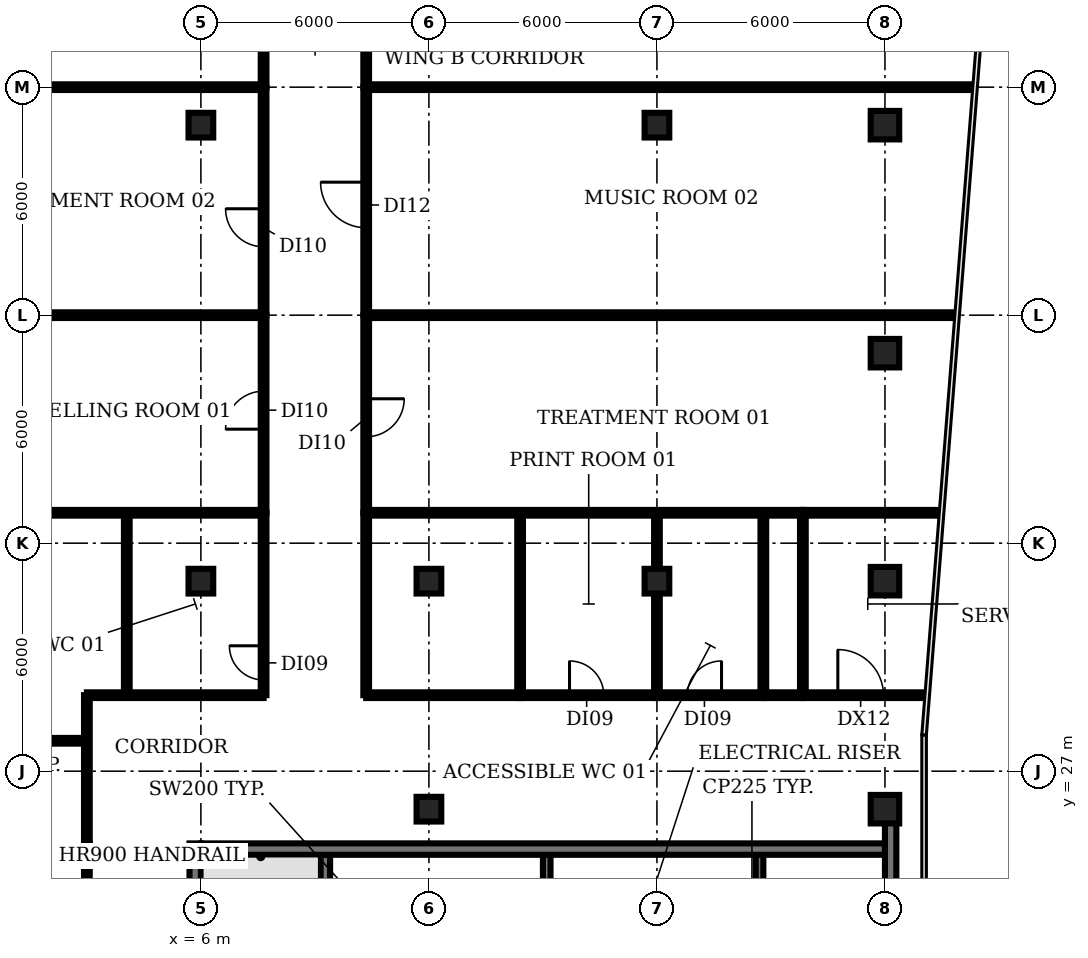
"""IFC4 building model, lengths in metres.
Left out: names, types, materials, properties, quantities, classifications, styles, units other than length and angle.
Written with IfcOpenShell. Run it as: python <this file> out.ifc"""

import sys

from ifc_helpers import new_model, si_unit, direction, frame, frame_2d, origin, origin_2d, place, context, subcontext, project, spatial, rectangle, extrude, element, fill, save


model = new_model("IFC4")
c1 = context("Model", 3, precision=1e-05, world=origin(), true_north=direction((0.0, 1.0)))
c2 = subcontext(c1, "Body", "Model", "MODEL_VIEW")
j1 = project(units=[si_unit("LENGTHUNIT", "METRE"), si_unit("PLANEANGLEUNIT", "RADIAN")], contexts=[c1])
p1 = place(None, origin())
s1 = spatial("IfcSite", under=j1, at=p1, CompositionType="ELEMENT")
p2 = place(p1, origin())
s2 = spatial("IfcBuilding", under=s1, at=p2, CompositionType="ELEMENT")
p3 = place(p2, frame((0.0, 0.0, 268.4)))
s3 = spatial("IfcBuildingStorey", under=s2, at=p3, CompositionType="ELEMENT", Elevation=268.4)
for number, where, z_axis, x_axis in (
    (1, (6.0, 32.0, 0.0), (0.0, 0.0, 1.0), (1.0, 0.0, 0.0)),
    (2, (6.0, 44.0, 0.0), (0.0, 0.0, 1.0), (1.0, 0.0, 0.0)),
    (3, (12.0, 26.0, 0.0), (0.0, 0.0, 1.0), (1.0, 0.0, 0.0)),
    (4, (12.0, 32.0, 0.0), (0.0, 0.0, 1.0), (1.0, 0.0, 0.0)),
    (5, (18.0, 32.0, 0.0), (0.0, 0.0, 1.0), (1.0, 0.0, 0.0)),
    (6, (18.0, 44.0, 0.0), (0.0, 0.0, 1.0), (1.0, 0.0, 0.0)),
):
    element("IfcColumn", number, at=place(p3, frame(where, z_axis=z_axis, x_axis=x_axis)), inside=s3, PredefinedType="COLUMN", context=c2, shape_type="SweptSolid", body=[
        extrude(rectangle(XDim=0.65, YDim=0.65, at=origin_2d()), origin(), (0.0, 0.0, 1.0), 3.8),
    ])
for number, where, z_axis, x_axis in (
    (7, (24.0, 26.0, 0.0), (0.0, 0.0, 1.0), (1.0, 0.0, 0.0)),
    (8, (24.0, 32.0, 0.0), (0.0, 0.0, 1.0), (1.0, 0.0, 0.0)),
    (9, (24.0, 38.0, 0.0), (0.0, 0.0, 1.0), (1.0, 0.0, 0.0)),
    (10, (24.0, 44.0, 0.0), (0.0, 0.0, 1.0), (1.0, 0.0, 0.0)),
):
    element("IfcColumn", number, at=place(p3, frame(where, z_axis=z_axis, x_axis=x_axis)), inside=s3, PredefinedType="COLUMN", context=c2, shape_type="SweptSolid", body=[
        extrude(rectangle(XDim=0.75, YDim=0.75, at=origin_2d()), origin(), (0.0, 0.0, 1.0), 3.8),
    ])
p4 = place(p3, frame((9.275, 18.375, 0.0), z_axis=(0.0, 0.0, 1.0), x_axis=(0.0, 1.0, 0.0)))
e11 = element("IfcWall", 11, at=p4, inside=s3, PredefinedType="SHEAR", context=c2, shape_type="SweptSolid", body=[
    extrude(rectangle(XDim=6.425, YDim=0.25, at=frame_2d((3.212, 0.0))), origin(), (0.0, 0.0, 1.0), 3.8),
])
for number, where, z_axis, x_axis in (
    (12, (15.1, 22.9, 0.0), (0.0, 0.0, 1.0), (0.0, 1.0, 0.0)),
    (13, (20.7, 22.9, 0.0), (0.0, 0.0, 1.0), (0.0, 1.0, 0.0)),
):
    element("IfcWall", number, at=place(p3, frame(where, z_axis=z_axis, x_axis=x_axis)), inside=s3, PredefinedType="SHEAR", context=c2, shape_type="SweptSolid", body=[
        extrude(rectangle(XDim=1.9, YDim=0.2, at=frame_2d((0.95, 0.0))), origin(), (0.0, 0.0, 1.0), 3.8),
    ])
p5 = place(p3, frame((5.85, 5.1, 0.0), z_axis=(0.0, 0.0, 1.0), x_axis=(0.0, 1.0, 0.0)))
e14 = element("IfcWall", 14, at=p5, inside=s3, PredefinedType="SHEAR", context=c2, shape_type="SweptSolid", body=[
    extrude(rectangle(XDim=20.0, YDim=0.3, at=frame_2d((10.0, 0.0))), origin(), (0.0, 0.0, 1.0), 3.8),
])
p6 = place(p5, frame((0.55, 0.0, 0.0)))
e15 = element("IfcOpeningElement", 15, at=p6, cuts=e14, PredefinedType="OPENING", context=c2, shape_type="SweptSolid", body=[
    extrude(rectangle(XDim=1.5, YDim=2.1, at=frame_2d((0.75, 1.05))), frame((0.0, 0.16, 0.0), z_axis=(0.0, -1.0, 0.0), x_axis=(1.0, 0.0, 0.0)), (0.0, 0.0, 1.0), 0.32),
])
p7 = place(p5, frame((7.0, 0.0, 0.0)))
e16 = element("IfcOpeningElement", 16, at=p7, cuts=e14, PredefinedType="OPENING", context=c2, shape_type="SweptSolid", body=[
    extrude(rectangle(XDim=1.2, YDim=2.1, at=frame_2d((0.6, 1.05))), frame((0.0, 0.16, 0.0), z_axis=(0.0, -1.0, 0.0), x_axis=(1.0, 0.0, 0.0)), (0.0, 0.0, 1.0), 0.32),
])
p8 = place(p5, frame((13.55, 0.0, 0.0)))
e17 = element("IfcOpeningElement", 17, at=p8, cuts=e14, PredefinedType="OPENING", context=c2, shape_type="SweptSolid", body=[
    extrude(rectangle(XDim=1.2, YDim=2.1, at=frame_2d((0.6, 1.05))), frame((0.0, 0.16, 0.0), z_axis=(0.0, -1.0, 0.0), x_axis=(1.0, 0.0, 0.0)), (0.0, 0.0, 1.0), 0.32),
])
p9 = place(p3, frame((24.15, 25.655, 0.0), z_axis=(0.0, 0.0, 1.0), x_axis=(0.0, -1.0, 0.0)))
e18 = element("IfcWall", 18, at=p9, inside=s3, PredefinedType="SHEAR", context=c2, shape_type="SweptSolid", body=[
    extrude(rectangle(XDim=20.555, YDim=0.3, at=frame_2d((10.277, 0.0))), origin(), (0.0, 0.0, 1.0), 3.8),
])
p10 = place(p9, frame((18.505, 0.0, 0.0)))
e19 = element("IfcOpeningElement", 19, at=p10, cuts=e18, PredefinedType="OPENING", context=c2, shape_type="SweptSolid", body=[
    extrude(rectangle(XDim=1.5, YDim=2.1, at=frame_2d((0.75, 1.05))), frame((0.0, 0.16, 0.0), z_axis=(0.0, -1.0, 0.0), x_axis=(1.0, 0.0, 0.0)), (0.0, 0.0, 1.0), 0.32),
])
p11 = place(p9, frame((12.405, 0.0, 0.0)))
e20 = element("IfcOpeningElement", 20, at=p11, cuts=e18, PredefinedType="OPENING", context=c2, shape_type="SweptSolid", body=[
    extrude(rectangle(XDim=0.9, YDim=2.1, at=frame_2d((0.45, 1.05))), frame((0.0, 0.16, 0.0), z_axis=(0.0, -1.0, 0.0), x_axis=(1.0, 0.0, 0.0)), (0.0, 0.0, 1.0), 0.32),
])
p12 = place(p9, frame((6.405, 0.0, 0.0)))
e21 = element("IfcOpeningElement", 21, at=p12, cuts=e18, PredefinedType="OPENING", context=c2, shape_type="SweptSolid", body=[
    extrude(rectangle(XDim=2.0, YDim=2.1, at=frame_2d((1.0, 1.05))), frame((0.0, 0.16, 0.0), z_axis=(0.0, -1.0, 0.0), x_axis=(1.0, 0.0, 0.0)), (0.0, 0.0, 1.0), 0.32),
])
p13 = place(p3, frame((6.0, 24.95, 0.0), z_axis=(0.0, 0.0, 1.0), x_axis=(1.0, 0.0, 0.0)))
e22 = element("IfcWall", 22, at=p13, inside=s3, PredefinedType="SHEAR", context=c2, shape_type="SweptSolid", body=[
    extrude(rectangle(XDim=18.0, YDim=0.3, at=frame_2d((9.0, 0.0))), origin(), (0.0, 0.0, 1.0), 3.8),
])
p14 = place(p3, frame((-1.07, 27.8, 0.0), z_axis=(0.0, 0.0, 1.0), x_axis=(1.0, 0.0, 0.0)))
e23 = element("IfcWall", 23, at=p14, inside=s3, PredefinedType="PARTITIONING", context=c2, shape_type="SweptSolid", body=[
    extrude(rectangle(XDim=4.07, YDim=0.15, at=frame_2d((2.035, 0.0))), origin(), (0.0, 0.0, 1.0), 2.85),
])
for number, where, z_axis, x_axis in (
    (24, (-0.98, 33.8, 0.0), (0.0, 0.0, 1.0), (1.0, 0.0, 0.0)),
    (25, (-0.98, 39.0, 0.0), (0.0, 0.0, 1.0), (1.0, 0.0, 0.0)),
    (26, (-0.98, 45.0, 0.0), (0.0, 0.0, 1.0), (1.0, 0.0, 0.0)),
):
    element("IfcWall", number, at=place(p3, frame(where, z_axis=z_axis, x_axis=x_axis)), inside=s3, PredefinedType="PARTITIONING", context=c2, shape_type="SweptSolid", body=[
        extrude(rectangle(XDim=8.63, YDim=0.15, at=frame_2d((4.315, 0.0))), origin(), (0.0, 0.0, 1.0), 2.85),
    ])
p15 = place(p3, frame((3.0, 5.1, 0.0), z_axis=(0.0, 0.0, 1.0), x_axis=(0.0, 1.0, 0.0)))
e27 = element("IfcWall", 27, at=p15, inside=s3, PredefinedType="PARTITIONING", context=c2, shape_type="SweptSolid", body=[
    extrude(rectangle(XDim=20.0, YDim=0.15, at=frame_2d((10.0, 0.0))), origin(), (0.0, 0.0, 1.0), 2.85),
])
p16 = place(p15, frame((9.3, 0.0, 0.0)))
e28 = element("IfcOpeningElement", 28, at=p16, cuts=e27, PredefinedType="OPENING", context=c2, shape_type="SweptSolid", body=[
    extrude(rectangle(XDim=1.2, YDim=2.1, at=frame_2d((0.6, 1.05))), frame((0.0, 0.085, 0.0), z_axis=(0.0, -1.0, 0.0), x_axis=(1.0, 0.0, 0.0)), (0.0, 0.0, 1.0), 0.17),
])
p17 = place(p3, frame((3.0, 25.1, 0.0), z_axis=(0.0, 0.0, 1.0), x_axis=(0.0, 1.0, 0.0)))
e29 = element("IfcWall", 29, at=p17, inside=s3, PredefinedType="PARTITIONING", context=c2, shape_type="SweptSolid", body=[
    extrude(rectangle(XDim=3.9, YDim=0.15, at=frame_2d((1.95, 0.0))), origin(), (0.0, 0.0, 1.0), 2.85),
])
p18 = place(p3, frame((3.0, 29.0, 0.0), z_axis=(0.0, 0.0, 1.0), x_axis=(1.0, 0.0, 0.0)))
e30 = element("IfcWall", 30, at=p18, inside=s3, PredefinedType="PARTITIONING", context=c2, shape_type="SweptSolid", body=[
    extrude(rectangle(XDim=4.65, YDim=0.15, at=frame_2d((2.325, 0.0))), origin(), (0.0, 0.0, 1.0), 2.85),
])
p19 = place(p3, frame((4.05, 29.0, 0.0), z_axis=(0.0, 0.0, 1.0), x_axis=(0.0, 1.0, 0.0)))
e31 = element("IfcWall", 31, at=p19, inside=s3, PredefinedType="PARTITIONING", context=c2, shape_type="SweptSolid", body=[
    extrude(rectangle(XDim=4.8, YDim=0.15, at=frame_2d((2.4, 0.0))), origin(), (0.0, 0.0, 1.0), 2.85),
])
p20 = place(p3, frame((7.65, 29.0, 0.0), z_axis=(0.0, 0.0, 1.0), x_axis=(0.0, 1.0, 0.0)))
e32 = element("IfcWall", 32, at=p20, inside=s3, PredefinedType="PARTITIONING", context=c2, shape_type="SweptSolid", body=[
    extrude(rectangle(XDim=4.8, YDim=0.15, at=frame_2d((2.4, 0.0))), origin(), (0.0, 0.0, 1.0), 2.85),
])
p21 = place(p20, frame((0.4, 0.0, 0.0)))
e33 = element("IfcOpeningElement", 33, at=p21, cuts=e32, PredefinedType="OPENING", context=c2, shape_type="SweptSolid", body=[
    extrude(rectangle(XDim=0.9, YDim=2.1, at=frame_2d((0.45, 1.05))), frame((0.0, 0.085, 0.0), z_axis=(0.0, -1.0, 0.0), x_axis=(1.0, 0.0, 0.0)), (0.0, 0.0, 1.0), 0.17),
])
p22 = place(p3, frame((7.65, 33.8, 0.0), z_axis=(0.0, 0.0, 1.0), x_axis=(0.0, 1.0, 0.0)))
e34 = element("IfcWall", 34, at=p22, inside=s3, PredefinedType="PARTITIONING", context=c2, shape_type="SweptSolid", body=[
    extrude(rectangle(XDim=5.2, YDim=0.15, at=frame_2d((2.6, 0.0))), origin(), (0.0, 0.0, 1.0), 2.85),
])
p23 = place(p22, frame((2.2, 0.0, 0.0)))
e35 = element("IfcOpeningElement", 35, at=p23, cuts=e34, PredefinedType="OPENING", context=c2, shape_type="SweptSolid", body=[
    extrude(rectangle(XDim=1.0, YDim=2.1, at=frame_2d((0.5, 1.05))), frame((0.0, 0.085, 0.0), z_axis=(0.0, -1.0, 0.0), x_axis=(1.0, 0.0, 0.0)), (0.0, 0.0, 1.0), 0.17),
])
p24 = place(p3, frame((7.65, 39.0, 0.0), z_axis=(0.0, 0.0, 1.0), x_axis=(0.0, 1.0, 0.0)))
e36 = element("IfcWall", 36, at=p24, inside=s3, PredefinedType="PARTITIONING", context=c2, shape_type="SweptSolid", body=[
    extrude(rectangle(XDim=6.0, YDim=0.15, at=frame_2d((3.0, 0.0))), origin(), (0.0, 0.0, 1.0), 2.85),
])
p25 = place(p24, frame((1.8, 0.0, 0.0)))
e37 = element("IfcOpeningElement", 37, at=p25, cuts=e36, PredefinedType="OPENING", context=c2, shape_type="SweptSolid", body=[
    extrude(rectangle(XDim=1.0, YDim=2.1, at=frame_2d((0.5, 1.05))), frame((0.0, 0.085, 0.0), z_axis=(0.0, -1.0, 0.0), x_axis=(1.0, 0.0, 0.0)), (0.0, 0.0, 1.0), 0.17),
])
p26 = place(p3, frame((7.65, 57.0, 0.0), z_axis=(0.0, 0.0, 1.0), x_axis=(0.0, -1.0, 0.0)))
e38 = element("IfcWall", 38, at=p26, inside=s3, PredefinedType="PARTITIONING", context=c2, shape_type="SweptSolid", body=[
    extrude(rectangle(XDim=12.0, YDim=0.15, at=frame_2d((6.0, 0.0))), origin(), (0.0, 0.0, 1.0), 2.85),
])
p27 = place(p26, frame((5.3, 0.0, 0.0)))
e39 = element("IfcOpeningElement", 39, at=p27, cuts=e38, PredefinedType="OPENING", context=c2, shape_type="SweptSolid", body=[
    extrude(rectangle(XDim=1.2, YDim=2.1, at=frame_2d((0.6, 1.05))), frame((0.0, 0.085, 0.0), z_axis=(0.0, -1.0, 0.0), x_axis=(1.0, 0.0, 0.0)), (0.0, 0.0, 1.0), 0.17),
])
p28 = place(p3, frame((10.35, 29.0, 0.0), z_axis=(0.0, 0.0, 1.0), x_axis=(0.0, 1.0, 0.0)))
e40 = element("IfcWall", 40, at=p28, inside=s3, PredefinedType="PARTITIONING", context=c2, shape_type="SweptSolid", body=[
    extrude(rectangle(XDim=4.8, YDim=0.15, at=frame_2d((2.4, 0.0))), origin(), (0.0, 0.0, 1.0), 2.85),
])
p29 = place(p3, frame((10.35, 29.0, 0.0), z_axis=(0.0, 0.0, 1.0), x_axis=(1.0, 0.0, 0.0)))
e41 = element("IfcWall", 41, at=p29, inside=s3, PredefinedType="PARTITIONING", context=c2, shape_type="SweptSolid", body=[
    extrude(rectangle(XDim=4.05, YDim=0.15, at=frame_2d((2.025, 0.0))), origin(), (0.0, 0.0, 1.0), 2.85),
])
p30 = place(p3, frame((10.35, 33.8, 0.0), z_axis=(0.0, 0.0, 1.0), x_axis=(1.0, 0.0, 0.0)))
e42 = element("IfcWall", 42, at=p30, inside=s3, PredefinedType="PARTITIONING", context=c2, shape_type="SweptSolid", body=[
    extrude(rectangle(XDim=11.49, YDim=0.15, at=frame_2d((5.745, 0.0))), origin(), (0.0, 0.0, 1.0), 2.85),
])
p31 = place(p3, frame((10.35, 39.0, 0.0), z_axis=(0.0, 0.0, 1.0), x_axis=(0.0, -1.0, 0.0)))
e43 = element("IfcWall", 43, at=p31, inside=s3, PredefinedType="PARTITIONING", context=c2, shape_type="SweptSolid", body=[
    extrude(rectangle(XDim=5.2, YDim=0.15, at=frame_2d((2.6, 0.0))), origin(), (0.0, 0.0, 1.0), 2.85),
])
p32 = place(p31, frame((2.2, 0.0, 0.0)))
e44 = element("IfcOpeningElement", 44, at=p32, cuts=e43, PredefinedType="OPENING", context=c2, shape_type="SweptSolid", body=[
    extrude(rectangle(XDim=1.0, YDim=2.1, at=frame_2d((0.5, 1.05))), frame((0.0, 0.085, 0.0), z_axis=(0.0, -1.0, 0.0), x_axis=(1.0, 0.0, 0.0)), (0.0, 0.0, 1.0), 0.17),
])
p33 = place(p3, frame((10.35, 39.0, 0.0), z_axis=(0.0, 0.0, 1.0), x_axis=(0.0, 1.0, 0.0)))
e45 = element("IfcWall", 45, at=p33, inside=s3, PredefinedType="PARTITIONING", context=c2, shape_type="SweptSolid", body=[
    extrude(rectangle(XDim=6.0, YDim=0.15, at=frame_2d((3.0, 0.0))), origin(), (0.0, 0.0, 1.0), 2.85),
])
p34 = place(p33, frame((2.3, 0.0, 0.0)))
e46 = element("IfcOpeningElement", 46, at=p34, cuts=e45, PredefinedType="OPENING", context=c2, shape_type="SweptSolid", body=[
    extrude(rectangle(XDim=1.2, YDim=2.1, at=frame_2d((0.6, 1.05))), frame((0.0, 0.085, 0.0), z_axis=(0.0, -1.0, 0.0), x_axis=(1.0, 0.0, 0.0)), (0.0, 0.0, 1.0), 0.17),
])
p35 = place(p3, frame((10.35, 39.0, 0.0), z_axis=(0.0, 0.0, 1.0), x_axis=(1.0, 0.0, 0.0)))
e47 = element("IfcWall", 47, at=p35, inside=s3, PredefinedType="PARTITIONING", context=c2, shape_type="SweptSolid", body=[
    extrude(rectangle(XDim=15.5, YDim=0.15, at=frame_2d((7.75, 0.0))), origin(), (0.0, 0.0, 1.0), 2.85),
])
p36 = place(p3, frame((10.35, 45.0, 0.0), z_axis=(0.0, 0.0, 1.0), x_axis=(0.0, 1.0, 0.0)))
e48 = element("IfcWall", 48, at=p36, inside=s3, PredefinedType="PARTITIONING", context=c2, shape_type="SweptSolid", body=[
    extrude(rectangle(XDim=12.0, YDim=0.15, at=frame_2d((6.0, 0.0))), origin(), (0.0, 0.0, 1.0), 2.85),
])
p37 = place(p36, frame((5.3, 0.0, 0.0)))
e49 = element("IfcOpeningElement", 49, at=p37, cuts=e48, PredefinedType="OPENING", context=c2, shape_type="SweptSolid", body=[
    extrude(rectangle(XDim=1.2, YDim=2.1, at=frame_2d((0.6, 1.05))), frame((0.0, 0.085, 0.0), z_axis=(0.0, -1.0, 0.0), x_axis=(1.0, 0.0, 0.0)), (0.0, 0.0, 1.0), 0.17),
])
p38 = place(p3, frame((10.35, 45.0, 0.0), z_axis=(0.0, 0.0, 1.0), x_axis=(1.0, 0.0, 0.0)))
e50 = element("IfcWall", 50, at=p38, inside=s3, PredefinedType="PARTITIONING", context=c2, shape_type="SweptSolid", body=[
    extrude(rectangle(XDim=15.957, YDim=0.15, at=frame_2d((7.979, 0.0))), origin(), (0.0, 0.0, 1.0), 2.85),
])
p39 = place(p3, frame((14.4, 29.0, 0.0), z_axis=(0.0, 0.0, 1.0), x_axis=(0.0, 1.0, 0.0)))
e51 = element("IfcWall", 51, at=p39, inside=s3, PredefinedType="PARTITIONING", context=c2, shape_type="SweptSolid", body=[
    extrude(rectangle(XDim=4.8, YDim=0.15, at=frame_2d((2.4, 0.0))), origin(), (0.0, 0.0, 1.0), 2.85),
])
p40 = place(p3, frame((14.4, 29.0, 0.0), z_axis=(0.0, 0.0, 1.0), x_axis=(1.0, 0.0, 0.0)))
e52 = element("IfcWall", 52, at=p40, inside=s3, PredefinedType="PARTITIONING", context=c2, shape_type="SweptSolid", body=[
    extrude(rectangle(XDim=3.6, YDim=0.15, at=frame_2d((1.8, 0.0))), origin(), (0.0, 0.0, 1.0), 2.85),
])
p41 = place(p40, frame((1.3, 0.0, 0.0)))
e53 = element("IfcOpeningElement", 53, at=p41, cuts=e52, PredefinedType="OPENING", context=c2, shape_type="SweptSolid", body=[
    extrude(rectangle(XDim=0.9, YDim=2.1, at=frame_2d((0.45, 1.05))), frame((0.0, 0.085, 0.0), z_axis=(0.0, -1.0, 0.0), x_axis=(1.0, 0.0, 0.0)), (0.0, 0.0, 1.0), 0.17),
])
p42 = place(p3, frame((18.0, 29.0, 0.0), z_axis=(0.0, 0.0, 1.0), x_axis=(0.0, 1.0, 0.0)))
e54 = element("IfcWall", 54, at=p42, inside=s3, PredefinedType="PARTITIONING", context=c2, shape_type="SweptSolid", body=[
    extrude(rectangle(XDim=4.8, YDim=0.15, at=frame_2d((2.4, 0.0))), origin(), (0.0, 0.0, 1.0), 2.85),
])
p43 = place(p3, frame((18.0, 29.0, 0.0), z_axis=(0.0, 0.0, 1.0), x_axis=(1.0, 0.0, 0.0)))
e55 = element("IfcWall", 55, at=p43, inside=s3, PredefinedType="PARTITIONING", context=c2, shape_type="SweptSolid", body=[
    extrude(rectangle(XDim=2.8, YDim=0.15, at=frame_2d((1.4, 0.0))), origin(), (0.0, 0.0, 1.0), 2.85),
])
p44 = place(p43, frame((0.8, 0.0, 0.0)))
e56 = element("IfcOpeningElement", 56, at=p44, cuts=e55, PredefinedType="OPENING", context=c2, shape_type="SweptSolid", body=[
    extrude(rectangle(XDim=0.9, YDim=2.1, at=frame_2d((0.45, 1.05))), frame((0.0, 0.085, 0.0), z_axis=(0.0, -1.0, 0.0), x_axis=(1.0, 0.0, 0.0)), (0.0, 0.0, 1.0), 0.17),
])
p45 = place(p3, frame((20.8, 29.0, 0.0), z_axis=(0.0, 0.0, 1.0), x_axis=(0.0, 1.0, 0.0)))
e57 = element("IfcWall", 57, at=p45, inside=s3, PredefinedType="PARTITIONING", context=c2, shape_type="SweptSolid", body=[
    extrude(rectangle(XDim=4.8, YDim=0.15, at=frame_2d((2.4, 0.0))), origin(), (0.0, 0.0, 1.0), 2.85),
])
p46 = place(p3, frame((20.8, 29.0, 0.0), z_axis=(0.0, 0.0, 1.0), x_axis=(1.0, 0.0, 0.0)))
e58 = element("IfcWall", 58, at=p46, inside=s3, PredefinedType="PARTITIONING", context=c2, shape_type="SweptSolid", body=[
    extrude(rectangle(XDim=1.04, YDim=0.15, at=frame_2d((0.52, 0.0))), origin(), (0.0, 0.0, 1.0), 2.85),
])
p47 = place(p3, frame((21.84, 29.0, 0.0), z_axis=(0.0, 0.0, 1.0), x_axis=(0.0, 1.0, 0.0)))
e59 = element("IfcWall", 59, at=p47, inside=s3, PredefinedType="PARTITIONING", context=c2, shape_type="SweptSolid", body=[
    extrude(rectangle(XDim=4.8, YDim=0.15, at=frame_2d((2.4, 0.0))), origin(), (0.0, 0.0, 1.0), 2.85),
])
p48 = place(p3, frame((21.84, 29.0, 0.0), z_axis=(0.0, 0.0, 1.0), x_axis=(1.0, 0.0, 0.0)))
e60 = element("IfcWall", 60, at=p48, inside=s3, PredefinedType="PARTITIONING", context=c2, shape_type="SweptSolid", body=[
    extrude(rectangle(XDim=3.22, YDim=0.15, at=frame_2d((1.61, 0.0))), origin(), (0.0, 0.0, 1.0), 2.85),
])
p49 = place(p48, frame((0.92, 0.0, 0.0)))
e61 = element("IfcOpeningElement", 61, at=p49, cuts=e60, PredefinedType="OPENING", context=c2, shape_type="SweptSolid", body=[
    extrude(rectangle(XDim=1.2, YDim=2.1, at=frame_2d((0.6, 1.05))), frame((0.0, 0.085, 0.0), z_axis=(0.0, -1.0, 0.0), x_axis=(1.0, 0.0, 0.0)), (0.0, 0.0, 1.0), 0.17),
])
p50 = place(p3, frame((21.84, 33.8, 0.0), z_axis=(0.0, 0.0, 1.0), x_axis=(1.0, 0.0, 0.0)))
e62 = element("IfcWall", 62, at=p50, inside=s3, PredefinedType="PARTITIONING", context=c2, shape_type="SweptSolid", body=[
    extrude(rectangle(XDim=3.6, YDim=0.15, at=frame_2d((1.8, 0.0))), origin(), (0.0, 0.0, 1.0), 2.85),
])
p51 = place(p21, origin())
e63 = element("IfcDoor", 63, at=p51, inside=s3, OperationType="SINGLE_SWING_RIGHT", PredefinedType="DOOR", context=c2, shape_type="SweptSolid", body=[
    extrude(rectangle(XDim=0.9, YDim=2.1, at=frame_2d((0.45, 1.05))), frame((0.0, 0.025, 0.0), z_axis=(0.0, -1.0, 0.0), x_axis=(1.0, 0.0, 0.0)), (0.0, 0.0, 1.0), 0.05),
])
fill(e33, e63)
p52 = place(p23, origin())
e64 = element("IfcDoor", 64, at=p52, inside=s3, OperationType="SINGLE_SWING_LEFT", PredefinedType="DOOR", context=c2, shape_type="SweptSolid", body=[
    extrude(rectangle(XDim=1.0, YDim=2.1, at=frame_2d((0.5, 1.05))), frame((0.0, 0.025, 0.0), z_axis=(0.0, -1.0, 0.0), x_axis=(1.0, 0.0, 0.0)), (0.0, 0.0, 1.0), 0.05),
])
fill(e35, e64)
p53 = place(p25, origin())
e65 = element("IfcDoor", 65, at=p53, inside=s3, OperationType="SINGLE_SWING_RIGHT", PredefinedType="DOOR", context=c2, shape_type="SweptSolid", body=[
    extrude(rectangle(XDim=1.0, YDim=2.1, at=frame_2d((0.5, 1.05))), frame((0.0, 0.025, 0.0), z_axis=(0.0, -1.0, 0.0), x_axis=(1.0, 0.0, 0.0)), (0.0, 0.0, 1.0), 0.05),
])
fill(e37, e65)
p54 = place(p32, origin())
e66 = element("IfcDoor", 66, at=p54, inside=s3, OperationType="SINGLE_SWING_LEFT", PredefinedType="DOOR", context=c2, shape_type="SweptSolid", body=[
    extrude(rectangle(XDim=1.0, YDim=2.1, at=frame_2d((0.5, 1.05))), frame((0.0, 0.025, 0.0), z_axis=(0.0, -1.0, 0.0), x_axis=(1.0, 0.0, 0.0)), (0.0, 0.0, 1.0), 0.05),
])
fill(e44, e66)
p55 = place(p34, origin())
e67 = element("IfcDoor", 67, at=p55, inside=s3, OperationType="SINGLE_SWING_RIGHT", PredefinedType="DOOR", context=c2, shape_type="SweptSolid", body=[
    extrude(rectangle(XDim=1.2, YDim=2.1, at=frame_2d((0.6, 1.05))), frame((0.0, 0.025, 0.0), z_axis=(0.0, -1.0, 0.0), x_axis=(1.0, 0.0, 0.0)), (0.0, 0.0, 1.0), 0.05),
])
fill(e46, e67)
p56 = place(p41, origin())
e68 = element("IfcDoor", 68, at=p56, inside=s3, OperationType="SINGLE_SWING_LEFT", PredefinedType="DOOR", context=c2, shape_type="SweptSolid", body=[
    extrude(rectangle(XDim=0.9, YDim=2.1, at=frame_2d((0.45, 1.05))), frame((0.0, 0.025, 0.0), z_axis=(0.0, -1.0, 0.0), x_axis=(1.0, 0.0, 0.0)), (0.0, 0.0, 1.0), 0.05),
])
fill(e53, e68)
p57 = place(p44, origin())
e69 = element("IfcDoor", 69, at=p57, inside=s3, OperationType="SINGLE_SWING_RIGHT", PredefinedType="DOOR", context=c2, shape_type="SweptSolid", body=[
    extrude(rectangle(XDim=0.9, YDim=2.1, at=frame_2d((0.45, 1.05))), frame((0.0, 0.025, 0.0), z_axis=(0.0, -1.0, 0.0), x_axis=(1.0, 0.0, 0.0)), (0.0, 0.0, 1.0), 0.05),
])
fill(e56, e69)
p58 = place(p49, origin())
e70 = element("IfcDoor", 70, at=p58, inside=s3, OperationType="SINGLE_SWING_LEFT", PredefinedType="DOOR", context=c2, shape_type="SweptSolid", body=[
    extrude(rectangle(XDim=1.2, YDim=2.1, at=frame_2d((0.6, 1.05))), frame((0.0, 0.025, 0.0), z_axis=(0.0, -1.0, 0.0), x_axis=(1.0, 0.0, 0.0)), (0.0, 0.0, 1.0), 0.05),
])
fill(e61, e70)
save(model, sys.argv[1])
